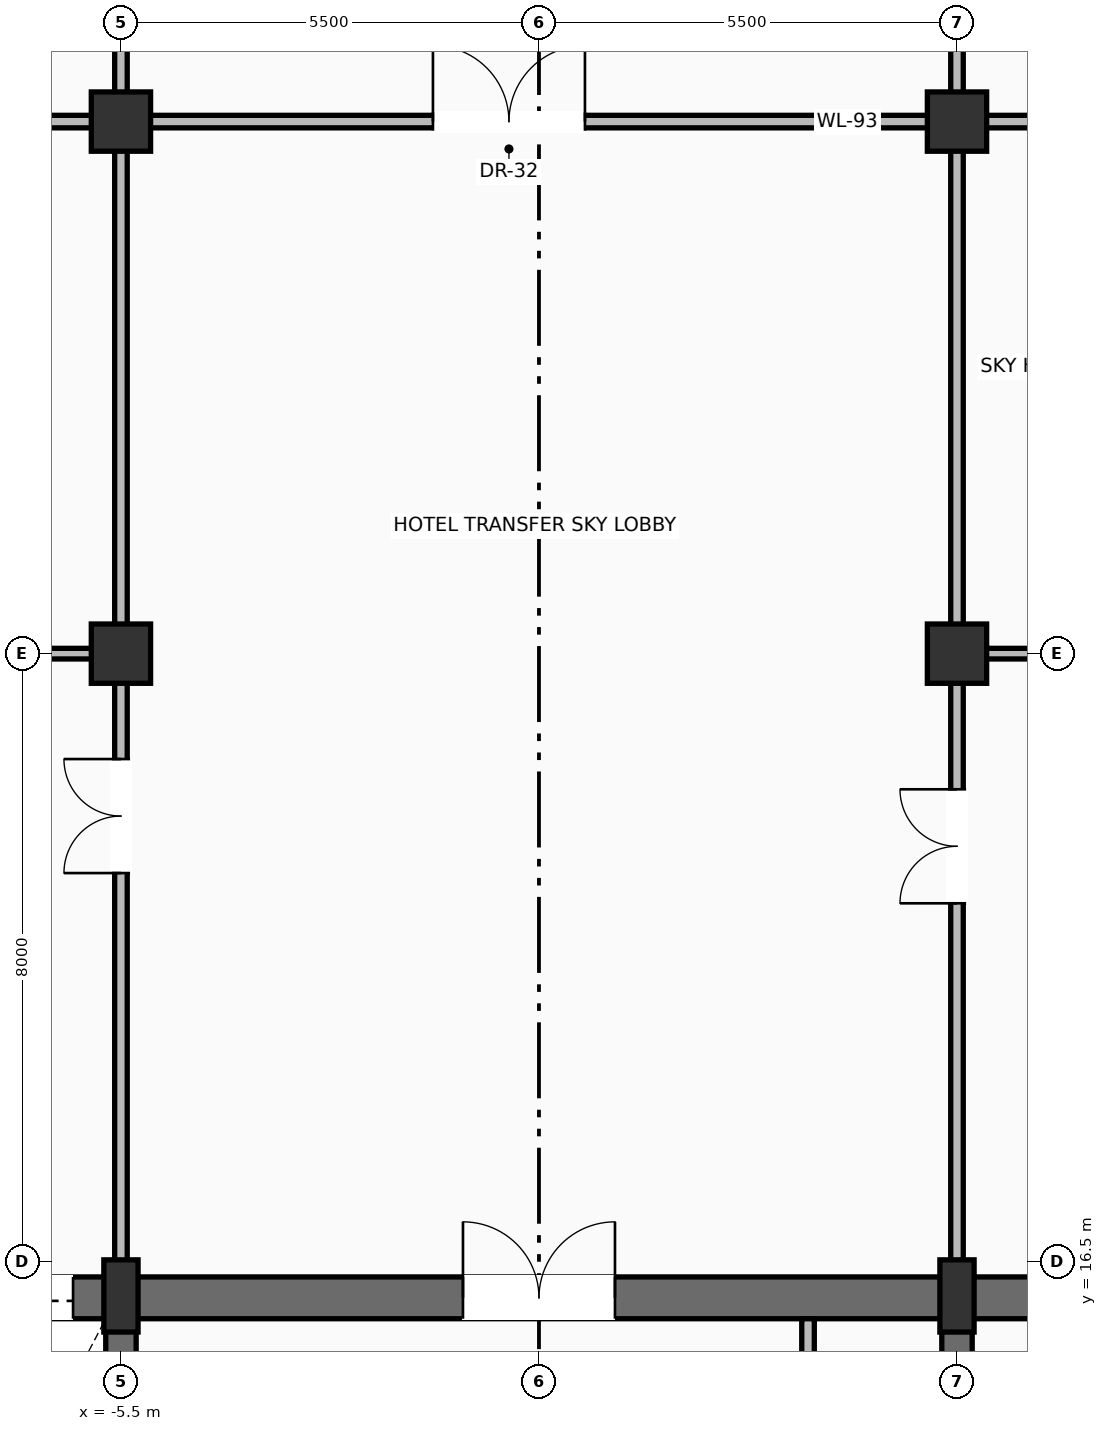
"""IFC4 building model, lengths in metres.
Left out: names, types, materials, properties, quantities, classifications, styles, units other than length and angle.
Written with IfcOpenShell. Run it as: python <this file> out.ifc"""

import sys

from ifc_helpers import new_model, si_unit, direction, frame, frame_2d, origin, origin_2d, place, context, subcontext, project, spatial, rectangle, extrude, source, transform, mapped, element, fill, save


model = new_model("IFC4")
c1 = context("Model", 3, precision=1e-05, world=origin(), true_north=direction((0.0, 1.0)))
c2 = subcontext(c1, "Body", "Model", "MODEL_VIEW")
j1 = project(units=[si_unit("LENGTHUNIT", "METRE"), si_unit("PLANEANGLEUNIT", "RADIAN")], contexts=[c1])
p1 = place(None, origin())
s1 = spatial("IfcSite", under=j1, at=p1, CompositionType="ELEMENT")
p2 = place(p1, origin())
s2 = spatial("IfcBuilding", under=s1, at=p2, CompositionType="ELEMENT")
p3 = place(p2, frame((0.0, 0.0, 215.4)))
s3 = spatial("IfcBuildingStorey", under=s2, at=p3, CompositionType="ELEMENT", Elevation=215.4)
p4 = place(p3, frame((-10.7, 16.025, 0.0), z_axis=(0.0, 0.0, 1.0), x_axis=(1.0, 0.0, 0.0)))
e1 = element("IfcWall", 1, at=p4, inside=s3, PredefinedType="SHEAR", context=c2, shape_type="SweptSolid", body=[
    extrude(rectangle(XDim=21.4, YDim=0.55, at=frame_2d((10.7, 0.0))), origin(), (0.0, 0.0, 1.0), 4.39),
])
p5 = place(p4, frame((3.27, 0.0, 0.0)))
e2 = element("IfcOpeningElement", 2, at=p5, cuts=e1, PredefinedType="OPENING", context=c2, shape_type="SweptSolid", body=[
    extrude(rectangle(XDim=1.3, YDim=2.3, at=frame_2d((0.65, 1.15))), frame((0.0, 0.285, 0.0), z_axis=(0.0, -1.0, 0.0), x_axis=(1.0, 0.0, 0.0)), (0.0, 0.0, 1.0), 0.57),
])
p6 = place(p4, frame((9.7, 0.0, 0.0)))
e3 = element("IfcOpeningElement", 3, at=p6, cuts=e1, PredefinedType="OPENING", context=c2, shape_type="SweptSolid", body=[
    extrude(rectangle(XDim=2.0, YDim=2.4, at=frame_2d((1.0, 1.2))), frame((0.0, 0.285, 0.0), z_axis=(0.0, -1.0, 0.0), x_axis=(1.0, 0.0, 0.0)), (0.0, 0.0, 1.0), 0.57),
])
p7 = place(p3, frame((-5.5, 0.575, 0.0), z_axis=(0.0, 0.0, 1.0), x_axis=(0.0, 1.0, 0.0)))
e4 = element("IfcWall", 4, at=p7, inside=s3, PredefinedType="SHEAR", context=c2, shape_type="SweptSolid", body=[
    extrude(rectangle(XDim=15.45, YDim=0.4, at=frame_2d((7.725, 0.0))), origin(), (0.0, 0.0, 1.0), 4.39),
])
p8 = place(p7, frame((8.925, 0.0, 0.0)))
e5 = element("IfcOpeningElement", 5, at=p8, cuts=e4, PredefinedType="OPENING", context=c2, shape_type="SweptSolid", body=[
    extrude(rectangle(XDim=1.1, YDim=2.2, at=frame_2d((0.55, 1.1))), frame((0.0, 0.21, 0.0), z_axis=(0.0, -1.0, 0.0), x_axis=(1.0, 0.0, 0.0)), (0.0, 0.0, 1.0), 0.42),
])
p9 = place(p3, frame((5.5, 0.575, 0.0), z_axis=(0.0, 0.0, 1.0), x_axis=(0.0, 1.0, 0.0)))
e6 = element("IfcWall", 6, at=p9, inside=s3, PredefinedType="SHEAR", context=c2, shape_type="SweptSolid", body=[
    extrude(rectangle(XDim=15.45, YDim=0.4, at=frame_2d((7.725, 0.0))), origin(), (0.0, 0.0, 1.0), 4.39),
])
p10 = place(p9, frame((8.925, 0.0, 0.0)))
e7 = element("IfcOpeningElement", 7, at=p10, cuts=e6, PredefinedType="OPENING", context=c2, shape_type="SweptSolid", body=[
    extrude(rectangle(XDim=1.1, YDim=2.2, at=frame_2d((0.55, 1.1))), frame((0.0, 0.21, 0.0), z_axis=(0.0, -1.0, 0.0), x_axis=(1.0, 0.0, 0.0)), (0.0, 0.0, 1.0), 0.42),
])
m1 = source(origin(), c2, "Body", "SweptSolid", [
    extrude(rectangle(XDim=0.45, YDim=0.95, at=origin_2d()), origin(), (0.0, 0.0, 1.0), 4.6),
])
for number, where, z_axis, x_axis in (
    (8, (-5.5, 16.05, 0.0), (0.0, 0.0, 1.0), (1.0, 0.0, 0.0)),
    (9, (5.5, 16.05, 0.0), (0.0, 0.0, 1.0), (1.0, 0.0, 0.0)),
):
    element("IfcColumn", number, at=place(p3, frame(where, z_axis=z_axis, x_axis=x_axis)), inside=s3, PredefinedType="PILASTER", context=c2, shape_type="MappedRepresentation", body=[
        mapped(m1, transform((0.0, 0.0, 0.0), scale=1.0)),
    ])
m2 = source(origin(), c2, "Body", "SweptSolid", [
    extrude(rectangle(XDim=0.78, YDim=0.78, at=origin_2d()), origin(), (0.0, 0.0, 1.0), 4.6),
])
for number, where, z_axis, x_axis in (
    (10, (-5.5, 24.5, 0.0), (0.0, 0.0, 1.0), (1.0, 0.0, 0.0)),
    (11, (5.5, 24.5, 0.0), (0.0, 0.0, 1.0), (1.0, 0.0, 0.0)),
    (12, (-5.5, 31.5, 0.0), (0.0, 0.0, 1.0), (1.0, 0.0, 0.0)),
    (13, (5.5, 31.5, 0.0), (0.0, 0.0, 1.0), (1.0, 0.0, 0.0)),
):
    element("IfcColumn", number, at=place(p3, frame(where, z_axis=z_axis, x_axis=x_axis)), inside=s3, PredefinedType="COLUMN", context=c2, shape_type="MappedRepresentation", body=[
        mapped(m2, transform((0.0, 0.0, 0.0), scale=1.0)),
    ])
p11 = place(p3, frame((3.54, 11.22, 0.0), z_axis=(0.0, 0.0, 1.0), x_axis=(0.0, 1.0, 0.0)))
e14 = element("IfcWall", 14, at=p11, inside=s3, PredefinedType="PARTITIONING", context=c2, shape_type="SweptSolid", body=[
    extrude(rectangle(XDim=4.53, YDim=0.165, at=frame_2d((2.265, 0.0))), origin(), (0.0, 0.0, 1.0), 4.382),
])
p12 = place(p11, frame((0.55, 0.0, 0.0)))
e15 = element("IfcOpeningElement", 15, at=p12, cuts=e14, PredefinedType="OPENING", context=c2, shape_type="SweptSolid", body=[
    extrude(rectangle(XDim=0.9, YDim=2.1, at=frame_2d((0.45, 1.05))), frame((0.0, 0.093, 0.0), z_axis=(0.0, -1.0, 0.0), x_axis=(1.0, 0.0, 0.0)), (0.0, 0.0, 1.0), 0.185),
])
p13 = place(p11, frame((2.85, 0.0, 0.0)))
e16 = element("IfcOpeningElement", 16, at=p13, cuts=e14, PredefinedType="OPENING", context=c2, shape_type="SweptSolid", body=[
    extrude(rectangle(XDim=0.9, YDim=2.1, at=frame_2d((0.45, 1.05))), frame((0.0, 0.093, 0.0), z_axis=(0.0, -1.0, 0.0), x_axis=(1.0, 0.0, 0.0)), (0.0, 0.0, 1.0), 0.185),
])
p14 = place(p3, frame((-10.509, 31.5, 0.0), z_axis=(0.0, 0.0, 1.0), x_axis=(1.0, 0.0, 0.0)))
e17 = element("IfcWall", 17, at=p14, inside=s3, PredefinedType="PARTITIONING", context=c2, shape_type="SweptSolid", body=[
    extrude(rectangle(XDim=20.228, YDim=0.165, at=frame_2d((10.114, 0.0))), origin(), (0.0, 0.0, 1.0), 3.833),
])
p15 = place(p14, frame((9.114, 0.0, 0.0)))
e18 = element("IfcOpeningElement", 18, at=p15, cuts=e17, PredefinedType="OPENING", context=c2, shape_type="SweptSolid", body=[
    extrude(rectangle(XDim=2.0, YDim=2.4, at=frame_2d((1.0, 1.2))), frame((0.0, 0.093, 0.0), z_axis=(0.0, -1.0, 0.0), x_axis=(1.0, 0.0, 0.0)), (0.0, 0.0, 1.0), 0.185),
])
p16 = place(p14, frame((17.464, 0.0, 0.0)))
e19 = element("IfcOpeningElement", 19, at=p16, cuts=e17, PredefinedType="OPENING", context=c2, shape_type="SweptSolid", body=[
    extrude(rectangle(XDim=0.95, YDim=2.2, at=frame_2d((0.475, 1.1))), frame((0.0, 0.093, 0.0), z_axis=(0.0, -1.0, 0.0), x_axis=(1.0, 0.0, 0.0)), (0.0, 0.0, 1.0), 0.185),
])
p17 = place(p14, frame((2.195, 0.0, 0.0)))
e20 = element("IfcOpeningElement", 20, at=p17, cuts=e17, PredefinedType="OPENING", context=c2, shape_type="SweptSolid", body=[
    extrude(rectangle(XDim=0.95, YDim=2.2, at=frame_2d((0.475, 1.1))), frame((0.0, 0.093, 0.0), z_axis=(0.0, -1.0, 0.0), x_axis=(1.0, 0.0, 0.0)), (0.0, 0.0, 1.0), 0.185),
])
p18 = place(p3, frame((-5.5, 16.32, 0.0), z_axis=(0.0, 0.0, 1.0), x_axis=(0.0, 1.0, 0.0)))
e21 = element("IfcWall", 21, at=p18, inside=s3, PredefinedType="PARTITIONING", context=c2, shape_type="SweptSolid", body=[
    extrude(rectangle(XDim=23.493, YDim=0.165, at=frame_2d((11.747, 0.0))), origin(), (0.0, 0.0, 1.0), 3.833),
])
p19 = place(p18, frame((5.293, 0.0, 0.0)))
e22 = element("IfcOpeningElement", 22, at=p19, cuts=e21, PredefinedType="OPENING", context=c2, shape_type="SweptSolid", body=[
    extrude(rectangle(XDim=1.5, YDim=2.25, at=frame_2d((0.75, 1.125))), frame((0.0, 0.093, 0.0), z_axis=(0.0, -1.0, 0.0), x_axis=(1.0, 0.0, 0.0)), (0.0, 0.0, 1.0), 0.185),
])
p20 = place(p3, frame((5.5, 16.32, 0.0), z_axis=(0.0, 0.0, 1.0), x_axis=(0.0, 1.0, 0.0)))
e23 = element("IfcWall", 23, at=p20, inside=s3, PredefinedType="PARTITIONING", context=c2, shape_type="SweptSolid", body=[
    extrude(rectangle(XDim=21.902, YDim=0.165, at=frame_2d((10.951, 0.0))), origin(), (0.0, 0.0, 1.0), 3.833),
])
p21 = place(p20, frame((4.896, 0.0, 0.0)))
e24 = element("IfcOpeningElement", 24, at=p21, cuts=e23, PredefinedType="OPENING", context=c2, shape_type="SweptSolid", body=[
    extrude(rectangle(XDim=1.5, YDim=2.25, at=frame_2d((0.75, 1.125))), frame((0.0, 0.093, 0.0), z_axis=(0.0, -1.0, 0.0), x_axis=(1.0, 0.0, 0.0)), (0.0, 0.0, 1.0), 0.185),
])
p22 = place(p3, frame((-14.726, 24.5, 0.0), z_axis=(0.0, 0.0, 1.0), x_axis=(1.0, 0.0, 0.0)))
e25 = element("IfcWall", 25, at=p22, inside=s3, PredefinedType="PARTITIONING", context=c2, shape_type="SweptSolid", body=[
    extrude(rectangle(XDim=9.226, YDim=0.14, at=frame_2d((4.613, 0.0))), origin(), (0.0, 0.0, 1.0), 3.833),
])
p23 = place(p22, frame((3.711, 0.0, 0.0)))
e26 = element("IfcOpeningElement", 26, at=p23, cuts=e25, PredefinedType="OPENING", context=c2, shape_type="SweptSolid", body=[
    extrude(rectangle(XDim=0.95, YDim=2.2, at=frame_2d((0.475, 1.1))), frame((0.0, 0.08, 0.0), z_axis=(0.0, -1.0, 0.0), x_axis=(1.0, 0.0, 0.0)), (0.0, 0.0, 1.0), 0.16),
])
p24 = place(p3, frame((5.5, 24.5, 0.0), z_axis=(0.0, 0.0, 1.0), x_axis=(1.0, 0.0, 0.0)))
e27 = element("IfcWall", 27, at=p24, inside=s3, PredefinedType="PARTITIONING", context=c2, shape_type="SweptSolid", body=[
    extrude(rectangle(XDim=8.612, YDim=0.14, at=frame_2d((4.306, 0.0))), origin(), (0.0, 0.0, 1.0), 3.833),
])
p25 = place(p24, frame((3.434, 0.0, 0.0)))
e28 = element("IfcOpeningElement", 28, at=p25, cuts=e27, PredefinedType="OPENING", context=c2, shape_type="SweptSolid", body=[
    extrude(rectangle(XDim=0.95, YDim=2.2, at=frame_2d((0.475, 1.1))), frame((0.0, 0.08, 0.0), z_axis=(0.0, -1.0, 0.0), x_axis=(1.0, 0.0, 0.0)), (0.0, 0.0, 1.0), 0.16),
])
m3 = source(origin(), c2, "Body", "SweptSolid", [
    extrude(rectangle(XDim=1.3, YDim=2.3, at=frame_2d((0.65, 1.15))), frame((0.0, 0.025, 0.0), z_axis=(0.0, -1.0, 0.0), x_axis=(1.0, 0.0, 0.0)), (0.0, 0.0, 1.0), 0.05),
])
p26 = place(p5, origin())
e29 = element("IfcDoor", 29, at=p26, inside=s3, OperationType="SLIDING_TO_RIGHT", PredefinedType="DOOR", context=c2, shape_type="MappedRepresentation", body=[
    mapped(m3, transform((0.0, 0.0, 0.0), scale=1.0)),
])
fill(e2, e29)
m4 = source(origin(), c2, "Body", "SweptSolid", [
    extrude(rectangle(XDim=2.0, YDim=2.4, at=frame_2d((1.0, 1.2))), frame((0.0, 0.025, 0.0), z_axis=(0.0, -1.0, 0.0), x_axis=(1.0, 0.0, 0.0)), (0.0, 0.0, 1.0), 0.05),
])
p27 = place(p6, origin())
e30 = element("IfcDoor", 30, at=p27, inside=s3, OperationType="DOUBLE_DOOR_SINGLE_SWING", PredefinedType="DOOR", context=c2, shape_type="MappedRepresentation", body=[
    mapped(m4, transform((0.0, 0.0, 0.0), scale=1.0)),
])
fill(e3, e30)
p28 = place(p15, origin())
e31 = element("IfcDoor", 31, at=p28, inside=s3, OperationType="DOUBLE_DOOR_SINGLE_SWING", PredefinedType="DOOR", context=c2, shape_type="MappedRepresentation", body=[
    mapped(m4, transform((0.0, 0.0, 0.0), scale=1.0)),
])
fill(e18, e31)
m5 = source(origin(), c2, "Body", "SweptSolid", [
    extrude(rectangle(XDim=1.5, YDim=2.25, at=frame_2d((0.75, 1.125))), frame((0.0, 0.025, 0.0), z_axis=(0.0, -1.0, 0.0), x_axis=(1.0, 0.0, 0.0)), (0.0, 0.0, 1.0), 0.05),
])
p29 = place(p19, origin())
e32 = element("IfcDoor", 32, at=p29, inside=s3, OperationType="DOUBLE_DOOR_SINGLE_SWING", PredefinedType="DOOR", context=c2, shape_type="MappedRepresentation", body=[
    mapped(m5, transform((0.0, 0.0, 0.0), scale=1.0)),
])
fill(e22, e32)
p30 = place(p21, origin())
e33 = element("IfcDoor", 33, at=p30, inside=s3, OperationType="DOUBLE_DOOR_SINGLE_SWING", PredefinedType="DOOR", context=c2, shape_type="MappedRepresentation", body=[
    mapped(m5, transform((0.0, 0.0, 0.0), scale=1.0)),
])
fill(e24, e33)
save(model, sys.argv[1])
